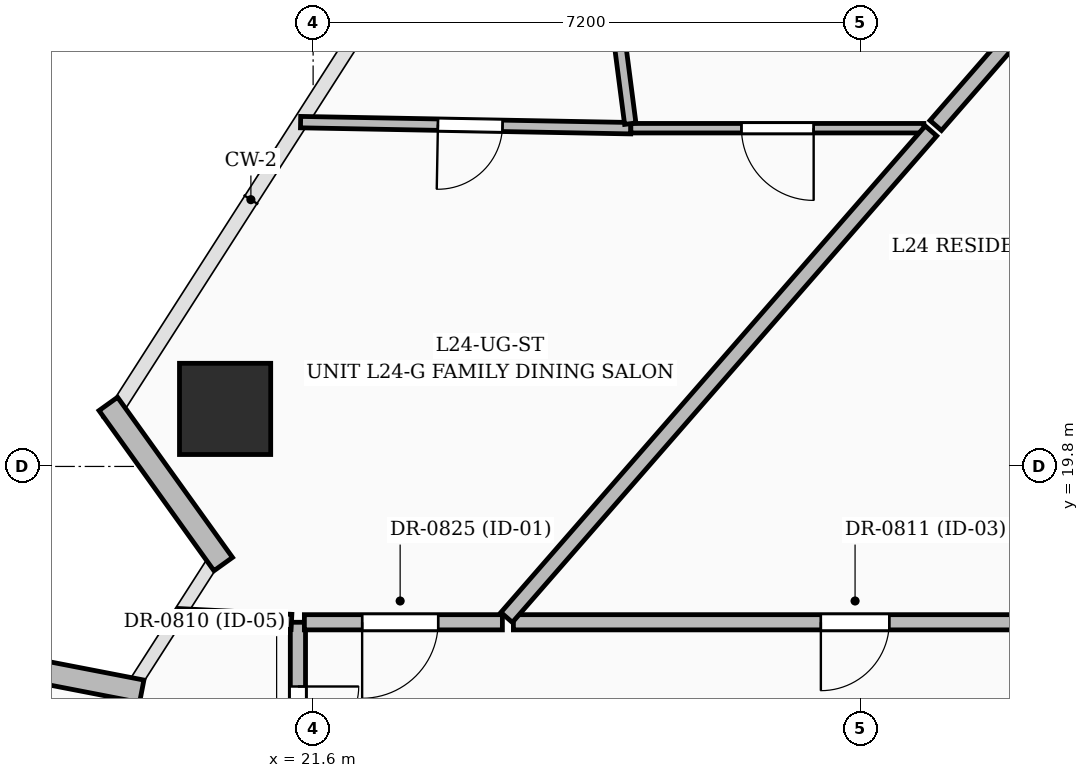
"""IFC4 building model, lengths in metres.
Left out: names, types, materials, properties, quantities, classifications, styles, units other than length and angle.
Written with IfcOpenShell. Run it as: python <this file> out.ifc"""

import sys

from ifc_helpers import new_model, si_unit, direction, frame, frame_2d, origin, origin_2d, place, context, subcontext, project, spatial, rectangle, extrude, element, fill, save


model = new_model("IFC4")
c1 = context("Model", 3, precision=1e-05, world=origin(), true_north=direction((0.0, 1.0)))
c2 = subcontext(c1, "Body", "Model", "MODEL_VIEW")
j1 = project(units=[si_unit("LENGTHUNIT", "METRE"), si_unit("PLANEANGLEUNIT", "RADIAN")], contexts=[c1])
p1 = place(None, origin())
s1 = spatial("IfcSite", under=j1, at=p1, CompositionType="ELEMENT")
p2 = place(p1, origin())
s2 = spatial("IfcBuilding", under=s1, at=p2, CompositionType="ELEMENT")
p3 = place(p2, frame((0.0, 0.0, 96.6)))
s3 = spatial("IfcBuildingStorey", under=s2, at=p3, CompositionType="ELEMENT", Elevation=96.6)
p4 = place(p3, frame((20.442, 20.557, 0.0), z_axis=(0.0, 0.0, 1.0), x_axis=(1.0, 0.0, 0.0)))
e1 = element("IfcColumn", 1, at=p4, inside=s3, PredefinedType="COLUMN", context=c2, shape_type="SweptSolid", body=[
    extrude(rectangle(XDim=1.2, YDim=1.2, at=origin_2d()), origin(), (0.0, 0.0, 1.0), 3.6),
])
p5 = place(p3, frame((16.8, 17.336, 0.0), z_axis=(0.0, 0.0, 1.0), x_axis=(0.981732795781, -0.190264861936, 0.0)))
e2 = element("IfcWall", 2, at=p5, inside=s3, PredefinedType="SOLIDWALL", context=c2, shape_type="SweptSolid", body=[
    extrude(rectangle(XDim=2.593, YDim=0.3, at=frame_2d((1.297, 0.0))), origin(), (0.0, 0.0, 1.0), 2.325),
])
p6 = place(p3, frame((20.417, 18.515, 0.0), z_axis=(0.0, 0.0, 1.0), x_axis=(-0.582937596749, 0.812516928006, 0.0)))
e3 = element("IfcWall", 3, at=p6, inside=s3, PredefinedType="SOLIDWALL", context=c2, shape_type="SweptSolid", body=[
    extrude(rectangle(XDim=2.594, YDim=0.3, at=frame_2d((1.297, 0.0))), origin(), (0.0, 0.0, 1.0), 2.325),
])
p7 = place(p3, frame((21.4, 17.75, 0.0), z_axis=(0.0, 0.0, 1.0), x_axis=(0.0, -1.0, 0.0)))
e4 = element("IfcWall", 4, at=p7, inside=s3, PredefinedType="PARTITIONING", context=c2, shape_type="SweptSolid", body=[
    extrude(rectangle(XDim=3.29, YDim=0.2, at=frame_2d((1.645, 0.0))), origin(), (0.0, 0.0, 1.0), 2.81),
])
p8 = place(p7, frame((0.845, 0.0, 0.0)))
e5 = element("IfcOpeningElement", 5, at=p8, cuts=e4, PredefinedType="OPENING", context=c2, shape_type="SweptSolid", body=[
    extrude(rectangle(XDim=1.6, YDim=2.3, at=frame_2d((0.8, 1.15))), frame((0.0, 0.11, 0.0), z_axis=(0.0, -1.0, 0.0), x_axis=(1.0, 0.0, 0.0)), (0.0, 0.0, 1.0), 0.22),
])
p9 = place(p3, frame((24.09, 17.75, 0.0), z_axis=(0.0, 0.0, 1.0), x_axis=(-1.0, 0.0, 0.0)))
e6 = element("IfcWall", 6, at=p9, inside=s3, PredefinedType="PARTITIONING", context=c2, shape_type="SweptSolid", body=[
    extrude(rectangle(XDim=2.605, YDim=0.2, at=frame_2d((1.302, 0.0))), origin(), (0.0, 0.0, 1.0), 2.295),
])
p10 = place(p9, frame((0.845, 0.0, 0.0)))
e7 = element("IfcOpeningElement", 7, at=p10, cuts=e6, PredefinedType="OPENING", context=c2, shape_type="SweptSolid", body=[
    extrude(rectangle(XDim=1.0, YDim=2.2, at=frame_2d((0.5, 1.1))), frame((0.0, 0.11, 0.0), z_axis=(0.0, -1.0, 0.0), x_axis=(1.0, 0.0, 0.0)), (0.0, 0.0, 1.0), 0.22),
])
p11 = place(p3, frame((33.37, 17.75, 0.0), z_axis=(0.0, 0.0, 1.0), x_axis=(-1.0, 0.0, 0.0)))
e8 = element("IfcWall", 8, at=p11, inside=s3, PredefinedType="PARTITIONING", context=c2, shape_type="SweptSolid", body=[
    extrude(rectangle(XDim=9.135, YDim=0.2, at=frame_2d((4.567, 0.0))), origin(), (0.0, 0.0, 1.0), 2.295),
])
p12 = place(p11, frame((4.19, 0.0, 0.0)))
e9 = element("IfcOpeningElement", 9, at=p12, cuts=e8, PredefinedType="OPENING", context=c2, shape_type="SweptSolid", body=[
    extrude(rectangle(XDim=0.9, YDim=2.1, at=frame_2d((0.45, 1.05))), frame((0.0, 0.11, 0.0), z_axis=(0.0, -1.0, 0.0), x_axis=(1.0, 0.0, 0.0)), (0.0, 0.0, 1.0), 0.22),
])
p13 = place(p3, frame((21.315, 17.754, 0.0), z_axis=(0.0, 0.0, 1.0), x_axis=(-0.998681222662, 0.05134019383, 0.0)))
e10 = element("IfcWall", 10, at=p13, inside=s3, PredefinedType="PARTITIONING", context=c2, shape_type="SweptSolid", body=[
    extrude(rectangle(XDim=1.493, YDim=0.2, at=frame_2d((0.747, 0.0))), origin(), (0.0, 0.0, 1.0), 3.3),
])
p14 = place(p3, frame((25.78, 24.25, 0.0), z_axis=(0.0, 0.0, 1.0), x_axis=(-0.999830209467, 0.018426943232, 0.0)))
e11 = element("IfcWall", 11, at=p14, inside=s3, PredefinedType="PARTITIONING", context=c2, shape_type="SweptSolid", body=[
    extrude(rectangle(XDim=4.346, YDim=0.15, at=frame_2d((2.173, 0.0))), origin(), (0.0, 0.0, 1.0), 2.32),
])
p15 = place(p14, frame((1.688, 0.0, 0.0)))
e12 = element("IfcOpeningElement", 12, at=p15, cuts=e11, PredefinedType="OPENING", context=c2, shape_type="SweptSolid", body=[
    extrude(rectangle(XDim=0.85, YDim=2.1, at=frame_2d((0.425, 1.05))), frame((0.0, 0.085, 0.0), z_axis=(0.0, -1.0, 0.0), x_axis=(1.0, 0.0, 0.0)), (0.0, 0.0, 1.0), 0.17),
])
p16 = place(p3, frame((29.635, 24.25, 0.0), z_axis=(0.0, 0.0, 1.0), x_axis=(-1.0, 0.0, 0.0)))
e13 = element("IfcWall", 13, at=p16, inside=s3, PredefinedType="PARTITIONING", context=c2, shape_type="SweptSolid", body=[
    extrude(rectangle(XDim=3.855, YDim=0.125, at=frame_2d((1.927, 0.0))), origin(), (0.0, 0.0, 1.0), 2.295),
])
p17 = place(p16, frame((1.45, 0.0, 0.0)))
e14 = element("IfcOpeningElement", 14, at=p17, cuts=e13, PredefinedType="OPENING", context=c2, shape_type="SweptSolid", body=[
    extrude(rectangle(XDim=0.95, YDim=2.2, at=frame_2d((0.475, 1.1))), frame((0.0, 0.072, 0.0), z_axis=(0.0, -1.0, 0.0), x_axis=(1.0, 0.0, 0.0)), (0.0, 0.0, 1.0), 0.145),
])
p18 = place(p3, frame((24.146, 17.814, 0.0), z_axis=(0.0, 0.0, 1.0), x_axis=(0.657360068694, 0.75357663186, 0.0)))
e15 = element("IfcWall", 15, at=p18, inside=s3, PredefinedType="PARTITIONING", context=c2, shape_type="SweptSolid", body=[
    extrude(rectangle(XDim=8.493, YDim=0.2, at=frame_2d((4.246, 0.0))), origin(), (0.0, 0.0, 1.0), 2.295),
])
p19 = place(p3, frame((25.773, 24.31, 0.0), z_axis=(0.0, 0.0, 1.0), x_axis=(-0.128542691679, 0.991703976203, 0.0)))
e16 = element("IfcWall", 16, at=p19, inside=s3, PredefinedType="PARTITIONING", context=c2, shape_type="SweptSolid", body=[
    extrude(rectangle(XDim=5.491, YDim=0.15, at=frame_2d((2.746, 0.0))), origin(), (0.0, 0.0, 1.0), 2.295),
])
p20 = place(p3, frame((29.791, 24.286, 0.0), z_axis=(0.0, 0.0, 1.0), x_axis=(0.656986124128, 0.753902667924, 0.0)))
e17 = element("IfcWall", 17, at=p20, inside=s3, PredefinedType="PARTITIONING", context=c2, shape_type="SweptSolid", body=[
    extrude(rectangle(XDim=6.824, YDim=0.2, at=frame_2d((3.412, 0.0))), origin(), (0.0, 0.0, 1.0), 2.81),
])
p21 = place(p8, origin())
e18 = element("IfcDoor", 18, at=p21, inside=s3, OperationType="DOUBLE_DOOR_SINGLE_SWING", PredefinedType="DOOR", context=c2, shape_type="SweptSolid", body=[
    extrude(rectangle(XDim=1.6, YDim=2.3, at=frame_2d((0.8, 1.15))), frame((0.0, 0.025, 0.0), z_axis=(0.0, -1.0, 0.0), x_axis=(1.0, 0.0, 0.0)), (0.0, 0.0, 1.0), 0.05),
])
fill(e5, e18)
p22 = place(p12, origin())
e19 = element("IfcDoor", 19, at=p22, inside=s3, OperationType="SINGLE_SWING_RIGHT", PredefinedType="DOOR", context=c2, shape_type="SweptSolid", body=[
    extrude(rectangle(XDim=0.9, YDim=2.1, at=frame_2d((0.45, 1.05))), frame((0.0, 0.025, 0.0), z_axis=(0.0, -1.0, 0.0), x_axis=(1.0, 0.0, 0.0)), (0.0, 0.0, 1.0), 0.05),
])
fill(e9, e19)
p23 = place(p10, origin())
e20 = element("IfcDoor", 20, at=p23, inside=s3, OperationType="SINGLE_SWING_RIGHT", PredefinedType="DOOR", context=c2, shape_type="SweptSolid", body=[
    extrude(rectangle(XDim=1.0, YDim=2.2, at=frame_2d((0.5, 1.1))), frame((0.0, 0.025, 0.0), z_axis=(0.0, -1.0, 0.0), x_axis=(1.0, 0.0, 0.0)), (0.0, 0.0, 1.0), 0.05),
])
fill(e7, e20)
p24 = place(p17, origin())
e21 = element("IfcDoor", 21, at=p24, inside=s3, OperationType="SINGLE_SWING_LEFT", PredefinedType="DOOR", context=c2, shape_type="SweptSolid", body=[
    extrude(rectangle(XDim=0.95, YDim=2.2, at=frame_2d((0.475, 1.1))), frame((0.0, 0.025, 0.0), z_axis=(0.0, -1.0, 0.0), x_axis=(1.0, 0.0, 0.0)), (0.0, 0.0, 1.0), 0.05),
])
fill(e14, e21)
p25 = place(p15, origin())
e22 = element("IfcDoor", 22, at=p25, inside=s3, OperationType="SINGLE_SWING_RIGHT", PredefinedType="DOOR", context=c2, shape_type="SweptSolid", body=[
    extrude(rectangle(XDim=0.85, YDim=2.1, at=frame_2d((0.425, 1.05))), frame((0.0, 0.025, 0.0), z_axis=(0.0, -1.0, 0.0), x_axis=(1.0, 0.0, 0.0)), (0.0, 0.0, 1.0), 0.05),
])
fill(e12, e22)
save(model, sys.argv[1])
